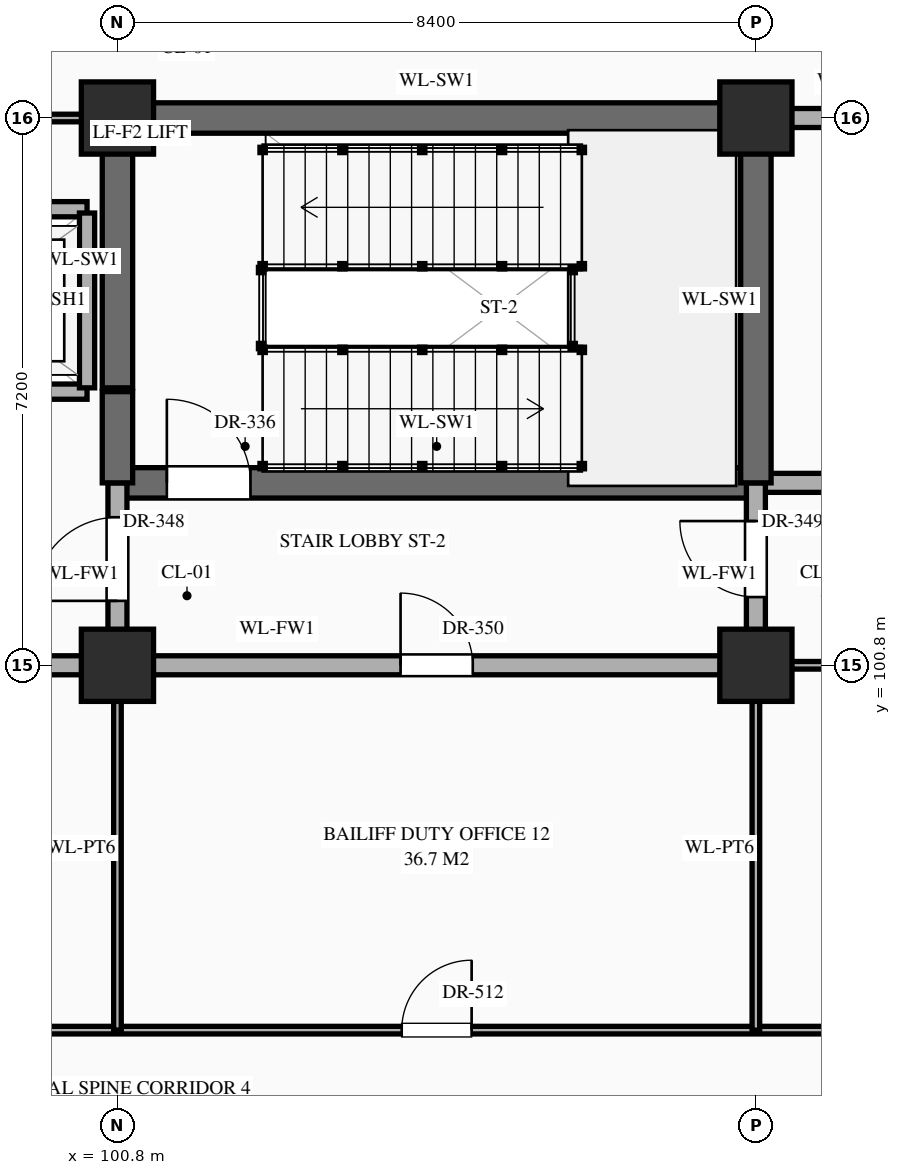
"""IFC4 building model, lengths in metres.
Left out: names, types, materials, properties, quantities, classifications, styles, units other than length and angle.
Written with IfcOpenShell. Run it as: python <this file> out.ifc"""

import sys

from ifc_helpers import new_model, si_unit, direction, frame, frame_2d, origin, origin_2d, place, context, subcontext, project, spatial, rectangle, extrude, element, fill, save


model = new_model("IFC4")
c1 = context("Model", 3, precision=1e-05, world=origin(), true_north=direction((0.0, 1.0)))
c2 = subcontext(c1, "Body", "Model", "MODEL_VIEW")
j1 = project(units=[si_unit("LENGTHUNIT", "METRE"), si_unit("PLANEANGLEUNIT", "RADIAN")], contexts=[c1])
p1 = place(None, origin())
s1 = spatial("IfcSite", under=j1, at=p1, CompositionType="ELEMENT")
p2 = place(p1, origin())
s2 = spatial("IfcBuilding", under=s1, at=p2, CompositionType="ELEMENT")
p3 = place(p2, frame((0.0, 0.0, -5.4)))
s3 = spatial("IfcBuildingStorey", under=s2, at=p3, CompositionType="ELEMENT", Elevation=-5.4)
for number, where, z_axis, x_axis in (
    (1, (100.8, 100.8, 0.0), (0.0, 0.0, 1.0), (1.0, 0.0, 0.0)),
    (2, (100.8, 108.0, 0.0), (0.0, 0.0, 1.0), (1.0, 0.0, 0.0)),
    (3, (109.2, 100.8, 0.0), (0.0, 0.0, 1.0), (1.0, 0.0, 0.0)),
    (4, (109.2, 108.0, 0.0), (0.0, 0.0, 1.0), (1.0, 0.0, 0.0)),
):
    element("IfcColumn", number, at=place(p3, frame(where, z_axis=z_axis, x_axis=x_axis)), inside=s3, PredefinedType="COLUMN", context=c2, shape_type="SweptSolid", body=[
        extrude(rectangle(XDim=0.95, YDim=0.95, at=origin_2d()), origin(), (0.0, 0.0, 1.0), 5.4),
    ])
p4 = place(p3, frame((16.8, 96.0, 0.0), z_axis=(0.0, 0.0, 1.0), x_axis=(1.0, 0.0, 0.0)))
e5 = element("IfcWall", 5, at=p4, inside=s3, PredefinedType="STANDARD", context=c2, shape_type="SweptSolid", body=[
    extrude(rectangle(XDim=134.4, YDim=0.1, at=frame_2d((67.2, 0.0))), origin(), (0.0, 0.0, 1.0), 5.1),
])
p5 = place(p4, frame((3.56, 0.0, 0.0)))
e6 = element("IfcOpeningElement", 6, at=p5, cuts=e5, PredefinedType="OPENING", context=c2, shape_type="SweptSolid", body=[
    extrude(rectangle(XDim=1.28, YDim=2.35, at=frame_2d((0.64, 1.175))), frame((0.0, 0.062, 0.0), z_axis=(0.0, -1.0, 0.0), x_axis=(1.0, 0.0, 0.0)), (0.0, 0.0, 1.0), 0.124),
])
p6 = place(p4, frame((9.63, 0.0, 0.0)))
e7 = element("IfcOpeningElement", 7, at=p6, cuts=e5, PredefinedType="OPENING", context=c2, shape_type="SweptSolid", body=[
    extrude(rectangle(XDim=0.94, YDim=2.3, at=frame_2d((0.47, 1.15))), frame((0.0, 0.062, 0.0), z_axis=(0.0, -1.0, 0.0), x_axis=(1.0, 0.0, 0.0)), (0.0, 0.0, 1.0), 0.124),
])
p7 = place(p4, frame((12.51, 0.0, 0.0)))
e8 = element("IfcOpeningElement", 8, at=p7, cuts=e5, PredefinedType="OPENING", context=c2, shape_type="SweptSolid", body=[
    extrude(rectangle(XDim=0.98, YDim=2.35, at=frame_2d((0.49, 1.175))), frame((0.0, 0.062, 0.0), z_axis=(0.0, -1.0, 0.0), x_axis=(1.0, 0.0, 0.0)), (0.0, 0.0, 1.0), 0.124),
])
p8 = place(p4, frame((14.99, 0.0, 0.0)))
e9 = element("IfcOpeningElement", 9, at=p8, cuts=e5, PredefinedType="OPENING", context=c2, shape_type="SweptSolid", body=[
    extrude(rectangle(XDim=1.02, YDim=2.4, at=frame_2d((0.51, 1.2))), frame((0.0, 0.062, 0.0), z_axis=(0.0, -1.0, 0.0), x_axis=(1.0, 0.0, 0.0)), (0.0, 0.0, 1.0), 0.124),
])
p9 = place(p4, frame((20.47, 0.0, 0.0)))
e10 = element("IfcOpeningElement", 10, at=p9, cuts=e5, PredefinedType="OPENING", context=c2, shape_type="SweptSolid", body=[
    extrude(rectangle(XDim=1.06, YDim=2.4, at=frame_2d((0.53, 1.2))), frame((0.0, 0.062, 0.0), z_axis=(0.0, -1.0, 0.0), x_axis=(1.0, 0.0, 0.0)), (0.0, 0.0, 1.0), 0.124),
])
p10 = place(p4, frame((28.83, 0.0, 0.0)))
e11 = element("IfcOpeningElement", 11, at=p10, cuts=e5, PredefinedType="OPENING", context=c2, shape_type="SweptSolid", body=[
    extrude(rectangle(XDim=1.14, YDim=2.4, at=frame_2d((0.57, 1.2))), frame((0.0, 0.062, 0.0), z_axis=(0.0, -1.0, 0.0), x_axis=(1.0, 0.0, 0.0)), (0.0, 0.0, 1.0), 0.124),
])
p11 = place(p4, frame((34.78, 0.0, 0.0)))
e12 = element("IfcOpeningElement", 12, at=p11, cuts=e5, PredefinedType="OPENING", context=c2, shape_type="SweptSolid", body=[
    extrude(rectangle(XDim=1.04, YDim=2.2, at=frame_2d((0.52, 1.1))), frame((0.0, 0.062, 0.0), z_axis=(0.0, -1.0, 0.0), x_axis=(1.0, 0.0, 0.0)), (0.0, 0.0, 1.0), 0.124),
])
p12 = place(p4, frame((37.66, 0.0, 0.0)))
e13 = element("IfcOpeningElement", 13, at=p12, cuts=e5, PredefinedType="OPENING", context=c2, shape_type="SweptSolid", body=[
    extrude(rectangle(XDim=1.08, YDim=2.25, at=frame_2d((0.54, 1.125))), frame((0.0, 0.062, 0.0), z_axis=(0.0, -1.0, 0.0), x_axis=(1.0, 0.0, 0.0)), (0.0, 0.0, 1.0), 0.124),
])
p13 = place(p4, frame((40.14, 0.0, 0.0)))
e14 = element("IfcOpeningElement", 14, at=p13, cuts=e5, PredefinedType="OPENING", context=c2, shape_type="SweptSolid", body=[
    extrude(rectangle(XDim=1.12, YDim=2.25, at=frame_2d((0.56, 1.125))), frame((0.0, 0.062, 0.0), z_axis=(0.0, -1.0, 0.0), x_axis=(1.0, 0.0, 0.0)), (0.0, 0.0, 1.0), 0.124),
])
p14 = place(p4, frame((45.62, 0.0, 0.0)))
e15 = element("IfcOpeningElement", 15, at=p14, cuts=e5, PredefinedType="OPENING", context=c2, shape_type="SweptSolid", body=[
    extrude(rectangle(XDim=1.16, YDim=2.3, at=frame_2d((0.58, 1.15))), frame((0.0, 0.062, 0.0), z_axis=(0.0, -1.0, 0.0), x_axis=(1.0, 0.0, 0.0)), (0.0, 0.0, 1.0), 0.124),
])
p15 = place(p4, frame((54.0, 0.0, 0.0)))
e16 = element("IfcOpeningElement", 16, at=p15, cuts=e5, PredefinedType="OPENING", context=c2, shape_type="SweptSolid", body=[
    extrude(rectangle(XDim=1.2, YDim=2.35, at=frame_2d((0.6, 1.175))), frame((0.0, 0.062, 0.0), z_axis=(0.0, -1.0, 0.0), x_axis=(1.0, 0.0, 0.0)), (0.0, 0.0, 1.0), 0.124),
])
p16 = place(p4, frame((62.38, 0.0, 0.0)))
e17 = element("IfcOpeningElement", 17, at=p16, cuts=e5, PredefinedType="OPENING", context=c2, shape_type="SweptSolid", body=[
    extrude(rectangle(XDim=1.24, YDim=2.3, at=frame_2d((0.62, 1.15))), frame((0.0, 0.062, 0.0), z_axis=(0.0, -1.0, 0.0), x_axis=(1.0, 0.0, 0.0)), (0.0, 0.0, 1.0), 0.124),
])
p17 = place(p4, frame((68.37, 0.0, 0.0)))
e18 = element("IfcOpeningElement", 18, at=p17, cuts=e5, PredefinedType="OPENING", context=c2, shape_type="SweptSolid", body=[
    extrude(rectangle(XDim=1.06, YDim=2.4, at=frame_2d((0.53, 1.2))), frame((0.0, 0.062, 0.0), z_axis=(0.0, -1.0, 0.0), x_axis=(1.0, 0.0, 0.0)), (0.0, 0.0, 1.0), 0.124),
])
p18 = place(p4, frame((71.23, 0.0, 0.0)))
e19 = element("IfcOpeningElement", 19, at=p18, cuts=e5, PredefinedType="OPENING", context=c2, shape_type="SweptSolid", body=[
    extrude(rectangle(XDim=1.14, YDim=2.4, at=frame_2d((0.57, 1.2))), frame((0.0, 0.062, 0.0), z_axis=(0.0, -1.0, 0.0), x_axis=(1.0, 0.0, 0.0)), (0.0, 0.0, 1.0), 0.124),
])
p19 = place(p4, frame((73.85, 0.0, 0.0)))
e20 = element("IfcOpeningElement", 20, at=p19, cuts=e5, PredefinedType="OPENING", context=c2, shape_type="SweptSolid", body=[
    extrude(rectangle(XDim=0.9, YDim=2.15, at=frame_2d((0.45, 1.075))), frame((0.0, 0.062, 0.0), z_axis=(0.0, -1.0, 0.0), x_axis=(1.0, 0.0, 0.0)), (0.0, 0.0, 1.0), 0.124),
])
p20 = place(p4, frame((79.37, 0.0, 0.0)))
e21 = element("IfcOpeningElement", 21, at=p20, cuts=e5, PredefinedType="OPENING", context=c2, shape_type="SweptSolid", body=[
    extrude(rectangle(XDim=0.86, YDim=2.1, at=frame_2d((0.43, 1.05))), frame((0.0, 0.062, 0.0), z_axis=(0.0, -1.0, 0.0), x_axis=(1.0, 0.0, 0.0)), (0.0, 0.0, 1.0), 0.124),
])
p21 = place(p4, frame((87.74, 0.0, 0.0)))
e22 = element("IfcOpeningElement", 22, at=p21, cuts=e5, PredefinedType="OPENING", context=c2, shape_type="SweptSolid", body=[
    extrude(rectangle(XDim=0.92, YDim=2.15, at=frame_2d((0.46, 1.075))), frame((0.0, 0.062, 0.0), z_axis=(0.0, -1.0, 0.0), x_axis=(1.0, 0.0, 0.0)), (0.0, 0.0, 1.0), 0.124),
])
p22 = place(p4, frame((93.62, 0.0, 0.0)))
e23 = element("IfcOpeningElement", 23, at=p22, cuts=e5, PredefinedType="OPENING", context=c2, shape_type="SweptSolid", body=[
    extrude(rectangle(XDim=0.96, YDim=2.2, at=frame_2d((0.48, 1.1))), frame((0.0, 0.062, 0.0), z_axis=(0.0, -1.0, 0.0), x_axis=(1.0, 0.0, 0.0)), (0.0, 0.0, 1.0), 0.124),
])
p23 = place(p4, frame((96.5, 0.0, 0.0)))
e24 = element("IfcOpeningElement", 24, at=p23, cuts=e5, PredefinedType="OPENING", context=c2, shape_type="SweptSolid", body=[
    extrude(rectangle(XDim=1.0, YDim=2.25, at=frame_2d((0.5, 1.125))), frame((0.0, 0.062, 0.0), z_axis=(0.0, -1.0, 0.0), x_axis=(1.0, 0.0, 0.0)), (0.0, 0.0, 1.0), 0.124),
])
p24 = place(p4, frame((98.98, 0.0, 0.0)))
e25 = element("IfcOpeningElement", 25, at=p24, cuts=e5, PredefinedType="OPENING", context=c2, shape_type="SweptSolid", body=[
    extrude(rectangle(XDim=1.04, YDim=2.2, at=frame_2d((0.52, 1.1))), frame((0.0, 0.062, 0.0), z_axis=(0.0, -1.0, 0.0), x_axis=(1.0, 0.0, 0.0)), (0.0, 0.0, 1.0), 0.124),
])
p25 = place(p4, frame((104.53, 0.0, 0.0)))
e26 = element("IfcOpeningElement", 26, at=p25, cuts=e5, PredefinedType="OPENING", context=c2, shape_type="SweptSolid", body=[
    extrude(rectangle(XDim=0.94, YDim=2.3, at=frame_2d((0.47, 1.15))), frame((0.0, 0.062, 0.0), z_axis=(0.0, -1.0, 0.0), x_axis=(1.0, 0.0, 0.0)), (0.0, 0.0, 1.0), 0.124),
])
p26 = place(p4, frame((112.91, 0.0, 0.0)))
e27 = element("IfcOpeningElement", 27, at=p26, cuts=e5, PredefinedType="OPENING", context=c2, shape_type="SweptSolid", body=[
    extrude(rectangle(XDim=0.98, YDim=2.35, at=frame_2d((0.49, 1.175))), frame((0.0, 0.062, 0.0), z_axis=(0.0, -1.0, 0.0), x_axis=(1.0, 0.0, 0.0)), (0.0, 0.0, 1.0), 0.124),
])
p27 = place(p4, frame((118.79, 0.0, 0.0)))
e28 = element("IfcOpeningElement", 28, at=p27, cuts=e5, PredefinedType="OPENING", context=c2, shape_type="SweptSolid", body=[
    extrude(rectangle(XDim=1.02, YDim=2.4, at=frame_2d((0.51, 1.2))), frame((0.0, 0.062, 0.0), z_axis=(0.0, -1.0, 0.0), x_axis=(1.0, 0.0, 0.0)), (0.0, 0.0, 1.0), 0.124),
])
p28 = place(p4, frame((121.67, 0.0, 0.0)))
e29 = element("IfcOpeningElement", 29, at=p28, cuts=e5, PredefinedType="OPENING", context=c2, shape_type="SweptSolid", body=[
    extrude(rectangle(XDim=1.06, YDim=2.4, at=frame_2d((0.53, 1.2))), frame((0.0, 0.062, 0.0), z_axis=(0.0, -1.0, 0.0), x_axis=(1.0, 0.0, 0.0)), (0.0, 0.0, 1.0), 0.124),
])
p29 = place(p4, frame((124.13, 0.0, 0.0)))
e30 = element("IfcOpeningElement", 30, at=p29, cuts=e5, PredefinedType="OPENING", context=c2, shape_type="SweptSolid", body=[
    extrude(rectangle(XDim=1.14, YDim=2.4, at=frame_2d((0.57, 1.2))), frame((0.0, 0.062, 0.0), z_axis=(0.0, -1.0, 0.0), x_axis=(1.0, 0.0, 0.0)), (0.0, 0.0, 1.0), 0.124),
])
p30 = place(p4, frame((129.75, 0.0, 0.0)))
e31 = element("IfcOpeningElement", 31, at=p30, cuts=e5, PredefinedType="OPENING", context=c2, shape_type="SweptSolid", body=[
    extrude(rectangle(XDim=0.9, YDim=2.15, at=frame_2d((0.45, 1.075))), frame((0.0, 0.062, 0.0), z_axis=(0.0, -1.0, 0.0), x_axis=(1.0, 0.0, 0.0)), (0.0, 0.0, 1.0), 0.124),
])
p31 = place(p3, frame((96.6, 100.8, 0.0), z_axis=(0.0, 0.0, 1.0), x_axis=(1.0, 0.0, 0.0)))
e32 = element("IfcWall", 32, at=p31, inside=s3, PredefinedType="STANDARD", context=c2, shape_type="SweptSolid", body=[
    extrude(rectangle(XDim=12.6, YDim=0.25, at=frame_2d((6.3, 0.0))), origin(), (0.0, 0.0, 1.0), 4.25),
])
p32 = place(p31, frame((7.925, 0.0, 0.0)))
e33 = element("IfcOpeningElement", 33, at=p32, cuts=e32, PredefinedType="OPENING", context=c2, shape_type="SweptSolid", body=[
    extrude(rectangle(XDim=0.95, YDim=2.15, at=frame_2d((0.475, 1.075))), frame((0.0, 0.137, 0.0), z_axis=(0.0, -1.0, 0.0), x_axis=(1.0, 0.0, 0.0)), (0.0, 0.0, 1.0), 0.274),
])
p33 = place(p3, frame((109.2, 100.8, 0.0), z_axis=(0.0, 0.0, 1.0), x_axis=(1.0, 0.0, 0.0)))
e34 = element("IfcWall", 34, at=p33, inside=s3, PredefinedType="STANDARD", context=c2, shape_type="SweptSolid", body=[
    extrude(rectangle(XDim=3.4, YDim=0.1, at=frame_2d((1.7, 0.0))), origin(), (0.0, 0.0, 1.0), 4.25),
])
p34 = place(p33, frame((1.387, 0.0, 0.0)))
e35 = element("IfcOpeningElement", 35, at=p34, cuts=e34, PredefinedType="OPENING", context=c2, shape_type="SweptSolid", body=[
    extrude(rectangle(XDim=1.02, YDim=2.4, at=frame_2d((0.51, 1.2))), frame((0.0, 0.062, 0.0), z_axis=(0.0, -1.0, 0.0), x_axis=(1.0, 0.0, 0.0)), (0.0, 0.0, 1.0), 0.124),
])
p35 = place(p3, frame((100.8, 103.2, 0.0), z_axis=(0.0, 0.0, 1.0), x_axis=(1.0, 0.0, 0.0)))
e36 = element("IfcWall", 36, at=p35, inside=s3, PredefinedType="SHEAR", context=c2, shape_type="SweptSolid", body=[
    extrude(rectangle(XDim=8.4, YDim=0.4, at=frame_2d((4.2, 0.0))), origin(), (0.0, 0.0, 1.0), 5.1),
])
p36 = place(p35, frame((0.65, 0.0, 0.0)))
e37 = element("IfcOpeningElement", 37, at=p36, cuts=e36, PredefinedType="OPENING", context=c2, shape_type="SweptSolid", body=[
    extrude(rectangle(XDim=1.1, YDim=2.2, at=frame_2d((0.55, 1.1))), frame((0.0, 0.212, 0.0), z_axis=(0.0, -1.0, 0.0), x_axis=(1.0, 0.0, 0.0)), (0.0, 0.0, 1.0), 0.424),
])
p37 = place(p3, frame((109.2, 103.2, 0.0), z_axis=(0.0, 0.0, 1.0), x_axis=(1.0, 0.0, 0.0)))
e38 = element("IfcWall", 38, at=p37, inside=s3, PredefinedType="STANDARD", context=c2, shape_type="SweptSolid", body=[
    extrude(rectangle(XDim=4.2, YDim=0.25, at=frame_2d((2.1, 0.0))), origin(), (0.0, 0.0, 1.0), 5.1),
])
p38 = place(p37, frame((1.625, 0.0, 0.0)))
e39 = element("IfcOpeningElement", 39, at=p38, cuts=e38, PredefinedType="OPENING", context=c2, shape_type="SweptSolid", body=[
    extrude(rectangle(XDim=0.95, YDim=2.15, at=frame_2d((0.475, 1.075))), frame((0.0, 0.137, 0.0), z_axis=(0.0, -1.0, 0.0), x_axis=(1.0, 0.0, 0.0)), (0.0, 0.0, 1.0), 0.274),
])
p39 = place(p3, frame((97.4, 104.4, 0.0), z_axis=(0.0, 0.0, 1.0), x_axis=(1.0, 0.0, 0.0)))
e40 = element("IfcWall", 40, at=p39, inside=s3, PredefinedType="STANDARD", context=c2, shape_type="SweptSolid", body=[
    extrude(rectangle(XDim=3.0, YDim=0.2, at=frame_2d((1.5, 0.0))), origin(), (0.0, 0.0, 1.0), 5.1),
])
p40 = place(p39, frame((0.9, 0.0, 0.0)))
e41 = element("IfcOpeningElement", 41, at=p40, cuts=e40, PredefinedType="OPENING", context=c2, shape_type="SweptSolid", body=[
    extrude(rectangle(XDim=1.2, YDim=2.15, at=frame_2d((0.6, 1.075))), frame((0.0, 0.112, 0.0), z_axis=(0.0, -1.0, 0.0), x_axis=(1.0, 0.0, 0.0)), (0.0, 0.0, 1.0), 0.224),
])
p41 = place(p3, frame((97.4, 106.8, 0.0), z_axis=(0.0, 0.0, 1.0), x_axis=(1.0, 0.0, 0.0)))
e42 = element("IfcWall", 42, at=p41, inside=s3, PredefinedType="STANDARD", context=c2, shape_type="SweptSolid", body=[
    extrude(rectangle(XDim=3.0, YDim=0.2, at=frame_2d((1.5, 0.0))), origin(), (0.0, 0.0, 1.0), 5.1),
])
p42 = place(p3, frame((96.65, 108.0, 0.0), z_axis=(0.0, 0.0, 1.0), x_axis=(1.0, 0.0, 0.0)))
e43 = element("IfcWall", 43, at=p42, inside=s3, PredefinedType="STANDARD", context=c2, shape_type="SweptSolid", body=[
    extrude(rectangle(XDim=4.1, YDim=0.1, at=frame_2d((2.05, 0.0))), origin(), (0.0, 0.0, 1.0), 4.25),
])
p43 = place(p3, frame((100.8, 108.0, 0.0), z_axis=(0.0, 0.0, 1.0), x_axis=(1.0, 0.0, 0.0)))
e44 = element("IfcWall", 44, at=p43, inside=s3, PredefinedType="SHEAR", context=c2, shape_type="SweptSolid", body=[
    extrude(rectangle(XDim=8.4, YDim=0.4, at=frame_2d((4.2, 0.0))), origin(), (0.0, 0.0, 1.0), 5.1),
])
p44 = place(p3, frame((109.2, 108.0, 0.0), z_axis=(0.0, 0.0, 1.0), x_axis=(1.0, 0.0, 0.0)))
e45 = element("IfcWall", 45, at=p44, inside=s3, PredefinedType="STANDARD", context=c2, shape_type="SweptSolid", body=[
    extrude(rectangle(XDim=4.2, YDim=0.25, at=frame_2d((2.1, 0.0))), origin(), (0.0, 0.0, 1.0), 4.25),
])
p45 = place(p44, frame((1.823, 0.0, 0.0)))
e46 = element("IfcOpeningElement", 46, at=p45, cuts=e45, PredefinedType="OPENING", context=c2, shape_type="SweptSolid", body=[
    extrude(rectangle(XDim=0.95, YDim=2.15, at=frame_2d((0.475, 1.075))), frame((0.0, 0.137, 0.0), z_axis=(0.0, -1.0, 0.0), x_axis=(1.0, 0.0, 0.0)), (0.0, 0.0, 1.0), 0.274),
])
p46 = place(p3, frame((100.4, 104.45, 0.0), z_axis=(0.0, 0.0, 1.0), x_axis=(0.0, 1.0, 0.0)))
e47 = element("IfcWall", 47, at=p46, inside=s3, PredefinedType="STANDARD", context=c2, shape_type="SweptSolid", body=[
    extrude(rectangle(XDim=2.3, YDim=0.2, at=frame_2d((1.15, 0.0))), origin(), (0.0, 0.0, 1.0), 5.1),
])
p47 = place(p3, frame((100.8, 96.0, 0.0), z_axis=(0.0, 0.0, 1.0), x_axis=(0.0, 1.0, 0.0)))
e48 = element("IfcWall", 48, at=p47, inside=s3, PredefinedType="STANDARD", context=c2, shape_type="SweptSolid", body=[
    extrude(rectangle(XDim=4.8, YDim=0.1, at=frame_2d((2.4, 0.0))), origin(), (0.0, 0.0, 1.0), 4.35),
])
p48 = place(p3, frame((100.8, 100.8, 0.0), z_axis=(0.0, 0.0, 1.0), x_axis=(0.0, 1.0, 0.0)))
e49 = element("IfcWall", 49, at=p48, inside=s3, PredefinedType="STANDARD", context=c2, shape_type="SweptSolid", body=[
    extrude(rectangle(XDim=2.4, YDim=0.25, at=frame_2d((1.2, 0.0))), origin(), (0.0, 0.0, 1.0), 4.35),
])
p49 = place(p48, frame((0.847, 0.0, 0.0)))
e50 = element("IfcOpeningElement", 50, at=p49, cuts=e49, PredefinedType="OPENING", context=c2, shape_type="SweptSolid", body=[
    extrude(rectangle(XDim=1.1, YDim=2.2, at=frame_2d((0.55, 1.1))), frame((0.0, 0.137, 0.0), z_axis=(0.0, -1.0, 0.0), x_axis=(1.0, 0.0, 0.0)), (0.0, 0.0, 1.0), 0.274),
])
p50 = place(p3, frame((100.8, 103.2, 0.0), z_axis=(0.0, 0.0, 1.0), x_axis=(0.0, 1.0, 0.0)))
e51 = element("IfcWall", 51, at=p50, inside=s3, PredefinedType="SHEAR", context=c2, shape_type="SweptSolid", body=[
    extrude(rectangle(XDim=1.2, YDim=0.4, at=frame_2d((0.6, 0.0))), origin(), (0.0, 0.0, 1.0), 5.1),
])
p51 = place(p3, frame((100.8, 104.45, 0.0), z_axis=(0.0, 0.0, 1.0), x_axis=(0.0, 1.0, 0.0)))
e52 = element("IfcWall", 52, at=p51, inside=s3, PredefinedType="SHEAR", context=c2, shape_type="SweptSolid", body=[
    extrude(rectangle(XDim=3.5, YDim=0.4, at=frame_2d((1.75, 0.0))), origin(), (0.0, 0.0, 1.0), 5.1),
])
p52 = place(p3, frame((109.2, 96.0, 0.0), z_axis=(0.0, 0.0, 1.0), x_axis=(0.0, 1.0, 0.0)))
e53 = element("IfcWall", 53, at=p52, inside=s3, PredefinedType="STANDARD", context=c2, shape_type="SweptSolid", body=[
    extrude(rectangle(XDim=4.8, YDim=0.1, at=frame_2d((2.4, 0.0))), origin(), (0.0, 0.0, 1.0), 4.35),
])
p53 = place(p3, frame((109.2, 100.8, 0.0), z_axis=(0.0, 0.0, 1.0), x_axis=(0.0, 1.0, 0.0)))
e54 = element("IfcWall", 54, at=p53, inside=s3, PredefinedType="STANDARD", context=c2, shape_type="SweptSolid", body=[
    extrude(rectangle(XDim=2.4, YDim=0.25, at=frame_2d((1.2, 0.0))), origin(), (0.0, 0.0, 1.0), 4.35),
])
p54 = place(p53, frame((0.897, 0.0, 0.0)))
e55 = element("IfcOpeningElement", 55, at=p54, cuts=e54, PredefinedType="OPENING", context=c2, shape_type="SweptSolid", body=[
    extrude(rectangle(XDim=1.0, YDim=2.2, at=frame_2d((0.5, 1.1))), frame((0.0, 0.137, 0.0), z_axis=(0.0, -1.0, 0.0), x_axis=(1.0, 0.0, 0.0)), (0.0, 0.0, 1.0), 0.274),
])
p55 = place(p3, frame((109.2, 103.2, 0.0), z_axis=(0.0, 0.0, 1.0), x_axis=(0.0, 1.0, 0.0)))
e56 = element("IfcWall", 56, at=p55, inside=s3, PredefinedType="SHEAR", context=c2, shape_type="SweptSolid", body=[
    extrude(rectangle(XDim=4.8, YDim=0.4, at=frame_2d((2.4, 0.0))), origin(), (0.0, 0.0, 1.0), 5.1),
])
p56 = place(p36, origin())
e57 = element("IfcDoor", 57, at=p56, inside=s3, OperationType="SINGLE_SWING_LEFT", PredefinedType="DOOR", context=c2, shape_type="SweptSolid", body=[
    extrude(rectangle(XDim=1.1, YDim=2.2, at=frame_2d((0.55, 1.1))), frame((0.0, 0.025, 0.0), z_axis=(0.0, -1.0, 0.0), x_axis=(1.0, 0.0, 0.0)), (0.0, 0.0, 1.0), 0.05),
])
fill(e37, e57)
p57 = place(p49, origin())
e58 = element("IfcDoor", 58, at=p57, inside=s3, OperationType="SINGLE_SWING_LEFT", PredefinedType="DOOR", context=c2, shape_type="SweptSolid", body=[
    extrude(rectangle(XDim=1.1, YDim=2.2, at=frame_2d((0.55, 1.1))), frame((0.0, 0.025, 0.0), z_axis=(0.0, -1.0, 0.0), x_axis=(1.0, 0.0, 0.0)), (0.0, 0.0, 1.0), 0.05),
])
fill(e50, e58)
p58 = place(p54, origin())
e59 = element("IfcDoor", 59, at=p58, inside=s3, OperationType="SINGLE_SWING_RIGHT", PredefinedType="DOOR", context=c2, shape_type="SweptSolid", body=[
    extrude(rectangle(XDim=1.0, YDim=2.2, at=frame_2d((0.5, 1.1))), frame((0.0, 0.025, 0.0), z_axis=(0.0, -1.0, 0.0), x_axis=(1.0, 0.0, 0.0)), (0.0, 0.0, 1.0), 0.05),
])
fill(e55, e59)
p59 = place(p32, origin())
e60 = element("IfcDoor", 60, at=p59, inside=s3, OperationType="SINGLE_SWING_LEFT", PredefinedType="DOOR", context=c2, shape_type="SweptSolid", body=[
    extrude(rectangle(XDim=0.95, YDim=2.15, at=frame_2d((0.475, 1.075))), frame((0.0, 0.025, 0.0), z_axis=(0.0, -1.0, 0.0), x_axis=(1.0, 0.0, 0.0)), (0.0, 0.0, 1.0), 0.05),
])
fill(e33, e60)
p60 = place(p21, origin())
e61 = element("IfcDoor", 61, at=p60, inside=s3, OperationType="SINGLE_SWING_RIGHT", PredefinedType="DOOR", context=c2, shape_type="SweptSolid", body=[
    extrude(rectangle(XDim=0.92, YDim=2.15, at=frame_2d((0.46, 1.075))), frame((0.0, 0.025, 0.0), z_axis=(0.0, -1.0, 0.0), x_axis=(1.0, 0.0, 0.0)), (0.0, 0.0, 1.0), 0.05),
])
fill(e22, e61)
save(model, sys.argv[1])
